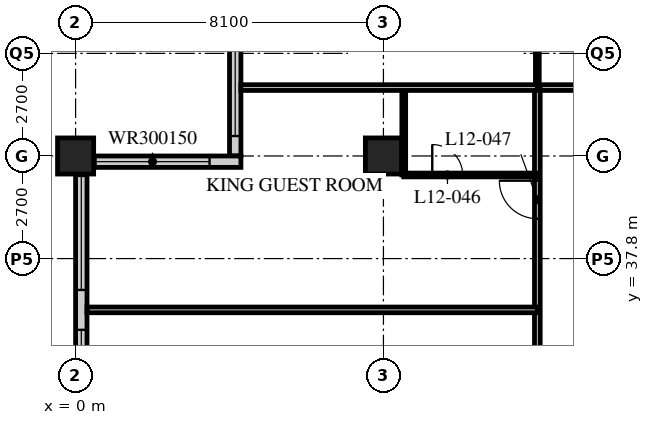
"""IFC4 building model, lengths in metres.
Left out: names, types, materials, properties, quantities, classifications, styles, units other than length and angle.
Written with IfcOpenShell. Run it as: python <this file> out.ifc"""

import sys

from ifc_helpers import new_model, si_unit, direction, frame, frame_2d, origin, origin_2d, place, context, subcontext, project, spatial, rectangle, hollow_rectangle, extrude, element, fill, save


model = new_model("IFC4")
c1 = context("Model", 3, precision=1e-05, world=origin(), true_north=direction((0.0, 1.0)))
c2 = subcontext(c1, "Body", "Model", "MODEL_VIEW")
j1 = project(units=[si_unit("LENGTHUNIT", "METRE"), si_unit("PLANEANGLEUNIT", "RADIAN")], contexts=[c1])
p1 = place(None, origin())
s1 = spatial("IfcSite", under=j1, at=p1, CompositionType="ELEMENT")
p2 = place(p1, origin())
s2 = spatial("IfcBuilding", under=s1, at=p2, CompositionType="ELEMENT")
p3 = place(p2, frame((0.0, 0.0, 53.4)))
s3 = spatial("IfcBuildingStorey", under=s2, at=p3, CompositionType="ELEMENT", Elevation=53.4)
for number, where, z_axis, x_axis in (
    (1, (0.0, 40.5, 0.0), (0.0, 0.0, 1.0), (1.0, 0.0, 0.0)),
    (2, (8.1, 40.5, 0.0), (0.0, 0.0, 1.0), (1.0, 0.0, 0.0)),
):
    element("IfcColumn", number, at=place(p3, frame(where, z_axis=z_axis, x_axis=x_axis)), inside=s3, PredefinedType="COLUMN", context=c2, shape_type="SweptSolid", body=[
        extrude(hollow_rectangle(XDim=0.95, YDim=0.95, WallThickness=0.095, at=origin_2d()), origin(), (0.0, 0.0, 1.0), 3.4),
    ])
p4 = place(p3, frame((4.2, 44.25, 0.0), z_axis=(0.0, 0.0, 1.0), x_axis=(0.0, -1.0, 0.0)))
e3 = element("IfcWall", 3, at=p4, inside=s3, PredefinedType="SOLIDWALL", context=c2, shape_type="SweptSolid", body=[
    extrude(rectangle(XDim=3.75, YDim=0.3, at=frame_2d((1.875, 0.0))), origin(), (0.0, 0.0, 1.0), 3.19),
])
p5 = place(p4, frame((0.225, 0.0, 0.9)))
e4 = element("IfcOpeningElement", 4, at=p5, cuts=e3, PredefinedType="OPENING", context=c2, shape_type="SweptSolid", body=[
    extrude(rectangle(XDim=3.0, YDim=1.5, at=frame_2d((1.5, 0.75))), frame((0.0, 0.16, 0.0), z_axis=(0.0, -1.0, 0.0), x_axis=(1.0, 0.0, 0.0)), (0.0, 0.0, 1.0), 0.32),
])
p6 = place(p3, frame((4.35, 40.35, 0.0), z_axis=(0.0, 0.0, 1.0), x_axis=(-1.0, 0.0, 0.0)))
e5 = element("IfcWall", 5, at=p6, inside=s3, PredefinedType="SOLIDWALL", context=c2, shape_type="SweptSolid", body=[
    extrude(rectangle(XDim=4.35, YDim=0.3, at=frame_2d((2.175, 0.0))), origin(), (0.0, 0.0, 1.0), 3.19),
])
p7 = place(p6, frame((0.825, 0.0, 0.9)))
e6 = element("IfcOpeningElement", 6, at=p7, cuts=e5, PredefinedType="OPENING", context=c2, shape_type="SweptSolid", body=[
    extrude(rectangle(XDim=3.0, YDim=1.5, at=frame_2d((1.5, 0.75))), frame((0.0, 0.16, 0.0), z_axis=(0.0, -1.0, 0.0), x_axis=(1.0, 0.0, 0.0)), (0.0, 0.0, 1.0), 0.32),
])
p8 = place(p3, frame((0.15, 40.2, 0.0), z_axis=(0.0, 0.0, 1.0), x_axis=(0.0, -1.0, 0.0)))
e7 = element("IfcWall", 7, at=p8, inside=s3, PredefinedType="SOLIDWALL", context=c2, shape_type="SweptSolid", body=[
    extrude(rectangle(XDim=32.1, YDim=0.3, at=frame_2d((16.05, 0.0))), origin(), (0.0, 0.0, 1.0), 3.19),
])
p9 = place(p8, frame((0.225, 0.0, 0.9)))
e8 = element("IfcOpeningElement", 8, at=p9, cuts=e7, PredefinedType="OPENING", context=c2, shape_type="SweptSolid", body=[
    extrude(rectangle(XDim=3.0, YDim=2.0, at=frame_2d((1.5, 1.0))), frame((0.0, 0.16, 0.0), z_axis=(0.0, -1.0, 0.0), x_axis=(1.0, 0.0, 0.0)), (0.0, 0.0, 1.0), 0.32),
])
p10 = place(p8, frame((4.275, 0.0, 0.9)))
e9 = element("IfcOpeningElement", 9, at=p10, cuts=e7, PredefinedType="OPENING", context=c2, shape_type="SweptSolid", body=[
    extrude(rectangle(XDim=3.0, YDim=2.0, at=frame_2d((1.5, 1.0))), frame((0.0, 0.16, 0.0), z_axis=(0.0, -1.0, 0.0), x_axis=(1.0, 0.0, 0.0)), (0.0, 0.0, 1.0), 0.32),
])
p11 = place(p8, frame((8.325, 0.0, 0.9)))
e10 = element("IfcOpeningElement", 10, at=p11, cuts=e7, PredefinedType="OPENING", context=c2, shape_type="SweptSolid", body=[
    extrude(rectangle(XDim=3.0, YDim=2.0, at=frame_2d((1.5, 1.0))), frame((0.0, 0.16, 0.0), z_axis=(0.0, -1.0, 0.0), x_axis=(1.0, 0.0, 0.0)), (0.0, 0.0, 1.0), 0.32),
])
p12 = place(p8, frame((12.375, 0.0, 0.9)))
e11 = element("IfcOpeningElement", 11, at=p12, cuts=e7, PredefinedType="OPENING", context=c2, shape_type="SweptSolid", body=[
    extrude(rectangle(XDim=3.0, YDim=2.0, at=frame_2d((1.5, 1.0))), frame((0.0, 0.16, 0.0), z_axis=(0.0, -1.0, 0.0), x_axis=(1.0, 0.0, 0.0)), (0.0, 0.0, 1.0), 0.32),
])
p13 = place(p8, frame((16.425, 0.0, 0.9)))
e12 = element("IfcOpeningElement", 12, at=p13, cuts=e7, PredefinedType="OPENING", context=c2, shape_type="SweptSolid", body=[
    extrude(rectangle(XDim=3.0, YDim=2.0, at=frame_2d((1.5, 1.0))), frame((0.0, 0.16, 0.0), z_axis=(0.0, -1.0, 0.0), x_axis=(1.0, 0.0, 0.0)), (0.0, 0.0, 1.0), 0.32),
])
p14 = place(p8, frame((20.475, 0.0, 0.9)))
e13 = element("IfcOpeningElement", 13, at=p14, cuts=e7, PredefinedType="OPENING", context=c2, shape_type="SweptSolid", body=[
    extrude(rectangle(XDim=3.0, YDim=2.0, at=frame_2d((1.5, 1.0))), frame((0.0, 0.16, 0.0), z_axis=(0.0, -1.0, 0.0), x_axis=(1.0, 0.0, 0.0)), (0.0, 0.0, 1.0), 0.32),
])
p15 = place(p8, frame((24.525, 0.0, 0.9)))
e14 = element("IfcOpeningElement", 14, at=p15, cuts=e7, PredefinedType="OPENING", context=c2, shape_type="SweptSolid", body=[
    extrude(rectangle(XDim=3.0, YDim=2.0, at=frame_2d((1.5, 1.0))), frame((0.0, 0.16, 0.0), z_axis=(0.0, -1.0, 0.0), x_axis=(1.0, 0.0, 0.0)), (0.0, 0.0, 1.0), 0.32),
])
p16 = place(p8, frame((28.575, 0.0, 0.9)))
e15 = element("IfcOpeningElement", 15, at=p16, cuts=e7, PredefinedType="OPENING", context=c2, shape_type="SweptSolid", body=[
    extrude(rectangle(XDim=3.0, YDim=2.0, at=frame_2d((1.5, 1.0))), frame((0.0, 0.16, 0.0), z_axis=(0.0, -1.0, 0.0), x_axis=(1.0, 0.0, 0.0)), (0.0, 0.0, 1.0), 0.32),
])
p17 = place(p3, frame((12.15, 42.3, 0.0), z_axis=(0.0, 0.0, 1.0), x_axis=(1.0, 0.0, 0.0)))
e16 = element("IfcWall", 16, at=p17, inside=s3, PredefinedType="PARTITIONING", context=c2, shape_type="SweptSolid", body=[
    extrude(rectangle(XDim=32.4, YDim=0.15, at=frame_2d((16.2, 0.0))), origin(), (0.0, 0.0, 1.0), 3.19),
])
p18 = place(p17, frame((6.5, 0.0, 0.0)))
e17 = element("IfcOpeningElement", 17, at=p18, cuts=e16, PredefinedType="OPENING", context=c2, shape_type="SweptSolid", body=[
    extrude(rectangle(XDim=1.0, YDim=2.1, at=frame_2d((0.5, 1.05))), frame((0.0, 0.085, 0.0), z_axis=(0.0, -1.0, 0.0), x_axis=(1.0, 0.0, 0.0)), (0.0, 0.0, 1.0), 0.17),
])
p19 = place(p17, frame((10.55, 0.0, 0.0)))
e18 = element("IfcOpeningElement", 18, at=p19, cuts=e16, PredefinedType="OPENING", context=c2, shape_type="SweptSolid", body=[
    extrude(rectangle(XDim=1.0, YDim=2.1, at=frame_2d((0.5, 1.05))), frame((0.0, 0.085, 0.0), z_axis=(0.0, -1.0, 0.0), x_axis=(1.0, 0.0, 0.0)), (0.0, 0.0, 1.0), 0.17),
])
p20 = place(p17, frame((14.6, 0.0, 0.0)))
e19 = element("IfcOpeningElement", 19, at=p20, cuts=e16, PredefinedType="OPENING", context=c2, shape_type="SweptSolid", body=[
    extrude(rectangle(XDim=1.0, YDim=2.1, at=frame_2d((0.5, 1.05))), frame((0.0, 0.085, 0.0), z_axis=(0.0, -1.0, 0.0), x_axis=(1.0, 0.0, 0.0)), (0.0, 0.0, 1.0), 0.17),
])
p21 = place(p17, frame((18.65, 0.0, 0.0)))
e20 = element("IfcOpeningElement", 20, at=p21, cuts=e16, PredefinedType="OPENING", context=c2, shape_type="SweptSolid", body=[
    extrude(rectangle(XDim=1.0, YDim=2.1, at=frame_2d((0.5, 1.05))), frame((0.0, 0.085, 0.0), z_axis=(0.0, -1.0, 0.0), x_axis=(1.0, 0.0, 0.0)), (0.0, 0.0, 1.0), 0.17),
])
p22 = place(p17, frame((22.7, 0.0, 0.0)))
e21 = element("IfcOpeningElement", 21, at=p22, cuts=e16, PredefinedType="OPENING", context=c2, shape_type="SweptSolid", body=[
    extrude(rectangle(XDim=1.0, YDim=2.1, at=frame_2d((0.5, 1.05))), frame((0.0, 0.085, 0.0), z_axis=(0.0, -1.0, 0.0), x_axis=(1.0, 0.0, 0.0)), (0.0, 0.0, 1.0), 0.17),
])
p23 = place(p17, frame((26.75, 0.0, 0.0)))
e22 = element("IfcOpeningElement", 22, at=p23, cuts=e16, PredefinedType="OPENING", context=c2, shape_type="SweptSolid", body=[
    extrude(rectangle(XDim=1.0, YDim=2.1, at=frame_2d((0.5, 1.05))), frame((0.0, 0.085, 0.0), z_axis=(0.0, -1.0, 0.0), x_axis=(1.0, 0.0, 0.0)), (0.0, 0.0, 1.0), 0.17),
])
p24 = place(p17, frame((28.775, 0.0, 0.0)))
e23 = element("IfcOpeningElement", 23, at=p24, cuts=e16, PredefinedType="OPENING", context=c2, shape_type="SweptSolid", body=[
    extrude(rectangle(XDim=1.0, YDim=2.1, at=frame_2d((0.5, 1.05))), frame((0.0, 0.085, 0.0), z_axis=(0.0, -1.0, 0.0), x_axis=(1.0, 0.0, 0.0)), (0.0, 0.0, 1.0), 0.17),
])
p25 = place(p17, frame((2.625, 0.0, 0.0)))
e24 = element("IfcOpeningElement", 24, at=p25, cuts=e16, PredefinedType="OPENING", context=c2, shape_type="SweptSolid", body=[
    extrude(rectangle(XDim=1.0, YDim=2.1, at=frame_2d((0.5, 1.05))), frame((0.0, 0.085, 0.0), z_axis=(0.0, -1.0, 0.0), x_axis=(1.0, 0.0, 0.0)), (0.0, 0.0, 1.0), 0.17),
])
p26 = place(p3, frame((12.15, 12.15, 0.0), z_axis=(0.0, 0.0, 1.0), x_axis=(0.0, 1.0, 0.0)))
e25 = element("IfcWall", 25, at=p26, inside=s3, PredefinedType="PARTITIONING", context=c2, shape_type="SweptSolid", body=[
    extrude(rectangle(XDim=30.15, YDim=0.15, at=frame_2d((15.075, 0.0))), origin(), (0.0, 0.0, 1.0), 3.19),
])
p27 = place(p26, frame((2.45, 0.0, 0.0)))
e26 = element("IfcOpeningElement", 26, at=p27, cuts=e25, PredefinedType="OPENING", context=c2, shape_type="SweptSolid", body=[
    extrude(rectangle(XDim=1.0, YDim=2.1, at=frame_2d((0.5, 1.05))), frame((0.0, 0.085, 0.0), z_axis=(0.0, -1.0, 0.0), x_axis=(1.0, 0.0, 0.0)), (0.0, 0.0, 1.0), 0.17),
])
p28 = place(p26, frame((6.5, 0.0, 0.0)))
e27 = element("IfcOpeningElement", 27, at=p28, cuts=e25, PredefinedType="OPENING", context=c2, shape_type="SweptSolid", body=[
    extrude(rectangle(XDim=1.0, YDim=2.1, at=frame_2d((0.5, 1.05))), frame((0.0, 0.085, 0.0), z_axis=(0.0, -1.0, 0.0), x_axis=(1.0, 0.0, 0.0)), (0.0, 0.0, 1.0), 0.17),
])
p29 = place(p26, frame((10.55, 0.0, 0.0)))
e28 = element("IfcOpeningElement", 28, at=p29, cuts=e25, PredefinedType="OPENING", context=c2, shape_type="SweptSolid", body=[
    extrude(rectangle(XDim=1.0, YDim=2.1, at=frame_2d((0.5, 1.05))), frame((0.0, 0.085, 0.0), z_axis=(0.0, -1.0, 0.0), x_axis=(1.0, 0.0, 0.0)), (0.0, 0.0, 1.0), 0.17),
])
p30 = place(p26, frame((14.6, 0.0, 0.0)))
e29 = element("IfcOpeningElement", 29, at=p30, cuts=e25, PredefinedType="OPENING", context=c2, shape_type="SweptSolid", body=[
    extrude(rectangle(XDim=1.0, YDim=2.1, at=frame_2d((0.5, 1.05))), frame((0.0, 0.085, 0.0), z_axis=(0.0, -1.0, 0.0), x_axis=(1.0, 0.0, 0.0)), (0.0, 0.0, 1.0), 0.17),
])
p31 = place(p26, frame((21.65, 0.0, 0.0)))
e30 = element("IfcOpeningElement", 30, at=p31, cuts=e25, PredefinedType="OPENING", context=c2, shape_type="SweptSolid", body=[
    extrude(rectangle(XDim=1.0, YDim=2.1, at=frame_2d((0.5, 1.05))), frame((0.0, 0.085, 0.0), z_axis=(0.0, -1.0, 0.0), x_axis=(1.0, 0.0, 0.0)), (0.0, 0.0, 1.0), 0.17),
])
p32 = place(p26, frame((26.7, 0.0, 0.0)))
e31 = element("IfcOpeningElement", 31, at=p32, cuts=e25, PredefinedType="OPENING", context=c2, shape_type="SweptSolid", body=[
    extrude(rectangle(XDim=1.0, YDim=2.1, at=frame_2d((0.5, 1.05))), frame((0.0, 0.085, 0.0), z_axis=(0.0, -1.0, 0.0), x_axis=(1.0, 0.0, 0.0)), (0.0, 0.0, 1.0), 0.17),
])
p33 = place(p3, frame((12.15, 36.45, 0.0), z_axis=(0.0, 0.0, 1.0), x_axis=(-1.0, 0.0, 0.0)))
e32 = element("IfcWall", 32, at=p33, inside=s3, PredefinedType="PARTITIONING", context=c2, shape_type="SweptSolid", body=[
    extrude(rectangle(XDim=11.85, YDim=0.15, at=frame_2d((5.925, 0.0))), origin(), (0.0, 0.0, 1.0), 3.19),
])
p34 = place(p3, frame((8.635, 40.0, 0.0), z_axis=(0.0, 0.0, 1.0), x_axis=(0.0, 1.0, 0.0)))
e33 = element("IfcWall", 33, at=p34, inside=s3, PredefinedType="PARTITIONING", context=c2, shape_type="SweptSolid", body=[
    extrude(rectangle(XDim=2.3, YDim=0.1, at=frame_2d((1.15, 0.0))), origin(), (0.0, 0.0, 1.0), 3.19),
])
p35 = place(p3, frame((12.15, 40.0, 0.0), z_axis=(0.0, 0.0, 1.0), x_axis=(-1.0, 0.0, 0.0)))
e34 = element("IfcWall", 34, at=p35, inside=s3, PredefinedType="PARTITIONING", context=c2, shape_type="SweptSolid", body=[
    extrude(rectangle(XDim=3.515, YDim=0.1, at=frame_2d((1.757, 0.0))), origin(), (0.0, 0.0, 1.0), 3.19),
])
p36 = place(p35, frame((1.965, 0.0, 0.0)))
e35 = element("IfcOpeningElement", 35, at=p36, cuts=e34, PredefinedType="OPENING", context=c2, shape_type="SweptSolid", body=[
    extrude(rectangle(XDim=0.8, YDim=2.1, at=frame_2d((0.4, 1.05))), frame((0.0, 0.06, 0.0), z_axis=(0.0, -1.0, 0.0), x_axis=(1.0, 0.0, 0.0)), (0.0, 0.0, 1.0), 0.12),
])
p37 = place(p3, frame((12.15, 42.3, 0.0), z_axis=(0.0, 0.0, 1.0), x_axis=(0.0, 1.0, 0.0)))
e36 = element("IfcWall", 36, at=p37, inside=s3, PredefinedType="PARTITIONING", context=c2, shape_type="SweptSolid", body=[
    extrude(rectangle(XDim=2.4, YDim=0.1, at=frame_2d((1.2, 0.0))), origin(), (0.0, 0.0, 1.0), 3.19),
])
p38 = place(p3, frame((4.35, 42.3, 0.0), z_axis=(0.0, 0.0, 1.0), x_axis=(1.0, 0.0, 0.0)))
e37 = element("IfcWall", 37, at=p38, inside=s3, PredefinedType="PARTITIONING", context=c2, shape_type="SweptSolid", body=[
    extrude(rectangle(XDim=7.8, YDim=0.15, at=frame_2d((3.9, 0.0))), origin(), (0.0, 0.0, 1.0), 3.19),
])
p39 = place(p5, origin())
e38 = element("IfcWindow", 38, at=p39, inside=s3, PartitioningType="SINGLE_PANEL", PredefinedType="WINDOW", context=c2, shape_type="SweptSolid", body=[
    extrude(rectangle(XDim=3.0, YDim=1.5, at=frame_2d((1.5, 0.75))), frame((0.0, 0.03, 0.0), z_axis=(0.0, -1.0, 0.0), x_axis=(1.0, 0.0, 0.0)), (0.0, 0.0, 1.0), 0.06),
])
fill(e4, e38)
p40 = place(p7, origin())
e39 = element("IfcWindow", 39, at=p40, inside=s3, PartitioningType="SINGLE_PANEL", PredefinedType="WINDOW", context=c2, shape_type="SweptSolid", body=[
    extrude(rectangle(XDim=3.0, YDim=1.5, at=frame_2d((1.5, 0.75))), frame((0.0, 0.03, 0.0), z_axis=(0.0, -1.0, 0.0), x_axis=(1.0, 0.0, 0.0)), (0.0, 0.0, 1.0), 0.06),
])
fill(e6, e39)
p41 = place(p9, origin())
e40 = element("IfcWindow", 40, at=p41, inside=s3, PartitioningType="SINGLE_PANEL", PredefinedType="WINDOW", context=c2, shape_type="SweptSolid", body=[
    extrude(rectangle(XDim=3.0, YDim=2.0, at=frame_2d((1.5, 1.0))), frame((0.0, 0.03, 0.0), z_axis=(0.0, -1.0, 0.0), x_axis=(1.0, 0.0, 0.0)), (0.0, 0.0, 1.0), 0.06),
])
fill(e8, e40)
p42 = place(p10, origin())
e41 = element("IfcWindow", 41, at=p42, inside=s3, PartitioningType="SINGLE_PANEL", PredefinedType="WINDOW", context=c2, shape_type="SweptSolid", body=[
    extrude(rectangle(XDim=3.0, YDim=2.0, at=frame_2d((1.5, 1.0))), frame((0.0, 0.03, 0.0), z_axis=(0.0, -1.0, 0.0), x_axis=(1.0, 0.0, 0.0)), (0.0, 0.0, 1.0), 0.06),
])
fill(e9, e41)
p43 = place(p36, origin())
e42 = element("IfcDoor", 42, at=p43, inside=s3, OperationType="SINGLE_SWING_LEFT", PredefinedType="DOOR", context=c2, shape_type="SweptSolid", body=[
    extrude(rectangle(XDim=0.8, YDim=2.1, at=frame_2d((0.4, 1.05))), frame((0.0, 0.025, 0.0), z_axis=(0.0, -1.0, 0.0), x_axis=(1.0, 0.0, 0.0)), (0.0, 0.0, 1.0), 0.05),
])
fill(e35, e42)
p44 = place(p32, origin())
e43 = element("IfcDoor", 43, at=p44, inside=s3, OperationType="SINGLE_SWING_RIGHT", PredefinedType="DOOR", context=c2, shape_type="SweptSolid", body=[
    extrude(rectangle(XDim=1.0, YDim=2.1, at=frame_2d((0.5, 1.05))), frame((0.0, 0.025, 0.0), z_axis=(0.0, -1.0, 0.0), x_axis=(1.0, 0.0, 0.0)), (0.0, 0.0, 1.0), 0.05),
])
fill(e31, e43)
save(model, sys.argv[1])
